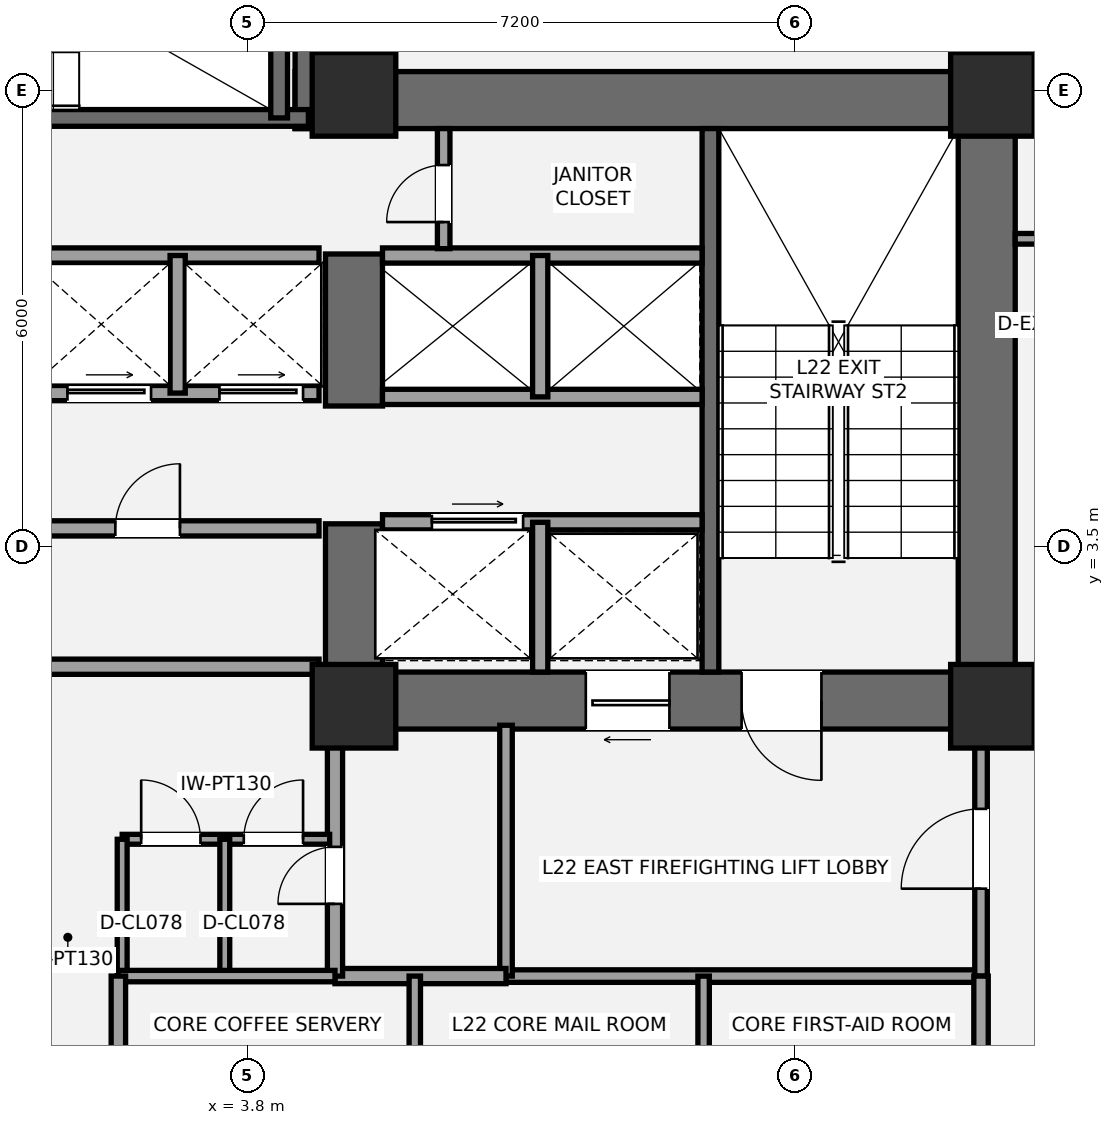
"""IFC4 building model, lengths in metres.
Left out: names, types, materials, properties, quantities, classifications, styles, units other than length and angle.
Written with IfcOpenShell. Run it as: python <this file> out.ifc"""

import sys

from ifc_helpers import new_model, si_unit, direction, frame, frame_2d, origin, origin_2d, place, context, subcontext, project, spatial, rectangle, extrude, element, fill, save


model = new_model("IFC4")
c1 = context("Model", 3, precision=1e-05, world=origin(), true_north=direction((0.0, 1.0)))
c2 = subcontext(c1, "Body", "Model", "MODEL_VIEW")
j1 = project(units=[si_unit("LENGTHUNIT", "METRE"), si_unit("PLANEANGLEUNIT", "RADIAN")], contexts=[c1])
p1 = place(None, origin())
s1 = spatial("IfcSite", under=j1, at=p1, CompositionType="ELEMENT")
p2 = place(p1, origin())
s2 = spatial("IfcBuilding", under=s1, at=p2, CompositionType="ELEMENT")
p3 = place(p2, frame((0.0, 0.0, 86.1)))
s3 = spatial("IfcBuildingStorey", under=s2, at=p3, CompositionType="ELEMENT", Elevation=86.1)
p4 = place(p3, frame((13.525, 1.1, 0.0), z_axis=(0.0, 0.0, 1.0), x_axis=(0.0, 1.0, 0.0)))
e1 = element("IfcWall", 1, at=p4, inside=s3, PredefinedType="SHEAR", context=c2, shape_type="SweptSolid", body=[
    extrude(rectangle(XDim=8.65, YDim=0.75, at=frame_2d((4.325, 0.0))), origin(), (0.0, 0.0, 1.0), 3.5),
])
p5 = place(p3, frame((4.425, 9.375, 0.0), z_axis=(0.0, 0.0, 1.0), x_axis=(1.0, 0.0, 0.0)))
e2 = element("IfcWall", 2, at=p5, inside=s3, PredefinedType="SHEAR", context=c2, shape_type="SweptSolid", body=[
    extrude(rectangle(XDim=9.475, YDim=0.75, at=frame_2d((4.737, 0.0))), origin(), (0.0, 0.0, 1.0), 3.5),
])
p6 = place(p3, frame((13.9, 1.475, 0.0), z_axis=(0.0, 0.0, 1.0), x_axis=(-1.0, 0.0, 0.0)))
e3 = element("IfcWall", 3, at=p6, inside=s3, PredefinedType="SHEAR", context=c2, shape_type="SweptSolid", body=[
    extrude(rectangle(XDim=9.075, YDim=0.75, at=frame_2d((4.538, 0.0))), origin(), (0.0, 0.0, 1.0), 3.5),
])
p7 = place(p6, frame((2.55, 0.0, 0.0)))
e4 = element("IfcOpeningElement", 4, at=p7, cuts=e3, PredefinedType="OPENING", context=c2, shape_type="SweptSolid", body=[
    extrude(rectangle(XDim=1.05, YDim=2.15, at=frame_2d((0.525, 1.075))), frame((0.0, 0.385, 0.0), z_axis=(0.0, -1.0, 0.0), x_axis=(1.0, 0.0, 0.0)), (0.0, 0.0, 1.0), 0.77),
])
p8 = place(p6, frame((4.55, 0.0, 0.0)))
e5 = element("IfcOpeningElement", 5, at=p8, cuts=e3, PredefinedType="OPENING", context=c2, shape_type="SweptSolid", body=[
    extrude(rectangle(XDim=1.1, YDim=2.2, at=frame_2d((0.55, 1.1))), frame((0.0, 0.385, 0.0), z_axis=(0.0, -1.0, 0.0), x_axis=(1.0, 0.0, 0.0)), (0.0, 0.0, 1.0), 0.77),
])
p9 = place(p3, frame((5.2, 1.1, 0.0), z_axis=(0.0, 0.0, 1.0), x_axis=(0.0, 1.0, 0.0)))
e6 = element("IfcWall", 6, at=p9, inside=s3, PredefinedType="SHEAR", context=c2, shape_type="SweptSolid", body=[
    extrude(rectangle(XDim=2.7, YDim=0.75, at=frame_2d((1.35, 0.0))), origin(), (0.0, 0.0, 1.0), 3.5),
])
p10 = place(p3, frame((5.2, 5.35, 0.0), z_axis=(0.0, 0.0, 1.0), x_axis=(0.0, 1.0, 0.0)))
e7 = element("IfcWall", 7, at=p10, inside=s3, PredefinedType="SHEAR", context=c2, shape_type="SweptSolid", body=[
    extrude(rectangle(XDim=2.0, YDim=0.75, at=frame_2d((1.0, 0.0))), origin(), (0.0, 0.0, 1.0), 3.5),
])
p11 = place(p3, frame((9.89, 1.85, 0.0), z_axis=(0.0, 0.0, 1.0), x_axis=(0.0, 1.0, 0.0)))
e8 = element("IfcWall", 8, at=p11, inside=s3, PredefinedType="SHEAR", context=c2, shape_type="SweptSolid", body=[
    extrude(rectangle(XDim=7.15, YDim=0.22, at=frame_2d((3.575, 0.0))), origin(), (0.0, 0.0, 1.0), 3.5),
])
p12 = place(p3, frame((4.8, 9.0, 0.0), z_axis=(0.0, 0.0, 1.0), x_axis=(0.0, 1.0, 0.0)))
e9 = element("IfcWall", 9, at=p12, inside=s3, PredefinedType="SHEAR", context=c2, shape_type="SweptSolid", body=[
    extrude(rectangle(XDim=4.15, YDim=0.75, at=frame_2d((2.075, 0.0))), origin(), (0.0, 0.0, 1.0), 3.5),
])
p13 = place(p3, frame((-4.7, 9.14, 0.0), z_axis=(0.0, 0.0, 1.0), x_axis=(1.0, 0.0, 0.0)))
e10 = element("IfcWall", 10, at=p13, inside=s3, PredefinedType="SHEAR", context=c2, shape_type="SweptSolid", body=[
    extrude(rectangle(XDim=9.3, YDim=0.22, at=frame_2d((4.65, 0.0))), origin(), (0.0, 0.0, 1.0), 3.5),
])
p14 = place(p13, frame((1.15, 0.0, 0.0)))
e11 = element("IfcOpeningElement", 11, at=p14, cuts=e10, PredefinedType="OPENING", context=c2, shape_type="SweptSolid", body=[
    extrude(rectangle(XDim=1.05, YDim=2.15, at=frame_2d((0.525, 1.075))), frame((0.0, 0.12, 0.0), z_axis=(0.0, -1.0, 0.0), x_axis=(1.0, 0.0, 0.0)), (0.0, 0.0, 1.0), 0.24),
])
p15 = place(p3, frame((4.215, 9.14, 0.0), z_axis=(0.0, 0.0, 1.0), x_axis=(0.0, 1.0, 0.0)))
e12 = element("IfcWall", 12, at=p15, inside=s3, PredefinedType="SHEAR", context=c2, shape_type="SweptSolid", body=[
    extrude(rectangle(XDim=3.26, YDim=0.22, at=frame_2d((1.63, 0.0))), origin(), (0.0, 0.0, 1.0), 3.5),
])
for number, where, z_axis, x_axis in (
    (13, (5.2, 1.4, 0.0), (0.0, 0.0, 1.0), (1.0, 0.0, 0.0)),
    (14, (5.2, 9.45, 0.0), (0.0, 0.0, 1.0), (1.0, 0.0, 0.0)),
    (15, (13.6, 1.4, 0.0), (0.0, 0.0, 1.0), (1.0, 0.0, 0.0)),
    (16, (13.6, 9.45, 0.0), (0.0, 0.0, 1.0), (1.0, 0.0, 0.0)),
):
    element("IfcColumn", number, at=place(p3, frame(where, z_axis=z_axis, x_axis=x_axis)), inside=s3, PredefinedType="COLUMN", context=c2, shape_type="SweptSolid", body=[
        extrude(rectangle(XDim=1.1, YDim=1.1, at=origin_2d()), origin(), (0.0, 0.0, 1.0), 3.5),
    ])
p16 = place(p3, frame((7.2, -2.15, 0.0), z_axis=(0.0, 0.0, 1.0), x_axis=(1.0, 0.0, 0.0)))
e17 = element("IfcWall", 17, at=p16, inside=s3, PredefinedType="PARTITIONING", context=c2, shape_type="SweptSolid", body=[
    extrude(rectangle(XDim=6.25, YDim=0.165, at=frame_2d((3.125, 0.0))), origin(), (0.0, 0.0, 1.0), 3.31),
])
p17 = place(p3, frame((7.2, -2.15, 0.0), z_axis=(0.0, 0.0, 1.0), x_axis=(0.0, 1.0, 0.0)))
e18 = element("IfcWall", 18, at=p17, inside=s3, PredefinedType="PARTITIONING", context=c2, shape_type="SweptSolid", body=[
    extrude(rectangle(XDim=3.3, YDim=0.165, at=frame_2d((1.65, 0.0))), origin(), (0.0, 0.0, 1.0), 2.763),
])
p18 = place(p3, frame((13.45, -2.15, 0.0), z_axis=(0.0, 0.0, 1.0), x_axis=(0.0, 1.0, 0.0)))
e19 = element("IfcWall", 19, at=p18, inside=s3, PredefinedType="PARTITIONING", context=c2, shape_type="SweptSolid", body=[
    extrude(rectangle(XDim=3.3, YDim=0.165, at=frame_2d((1.65, 0.0))), origin(), (0.0, 0.0, 1.0), 2.763),
])
p19 = place(p18, frame((1.15, 0.0, 0.0)))
e20 = element("IfcOpeningElement", 20, at=p19, cuts=e19, PredefinedType="OPENING", context=c2, shape_type="SweptSolid", body=[
    extrude(rectangle(XDim=1.05, YDim=2.15, at=frame_2d((0.525, 1.075))), frame((0.0, 0.093, 0.0), z_axis=(0.0, -1.0, 0.0), x_axis=(1.0, 0.0, 0.0)), (0.0, 0.0, 1.0), 0.185),
])
p20 = place(p3, frame((4.95, -2.15, 0.0), z_axis=(0.0, 0.0, 1.0), x_axis=(1.0, 0.0, 0.0)))
e21 = element("IfcWall", 21, at=p20, inside=s3, PredefinedType="SOLIDWALL", context=c2, shape_type="SweptSolid", body=[
    extrude(rectangle(XDim=2.25, YDim=0.2, at=frame_2d((1.125, 0.0))), origin(), (0.0, 0.0, 1.0), 3.31),
])
p21 = place(p3, frame((4.95, -2.15, 0.0), z_axis=(0.0, 0.0, 1.0), x_axis=(0.0, 1.0, 0.0)))
e22 = element("IfcWall", 22, at=p21, inside=s3, PredefinedType="SOLIDWALL", context=c2, shape_type="SweptSolid", body=[
    extrude(rectangle(XDim=3.3, YDim=0.2, at=frame_2d((1.65, 0.0))), origin(), (0.0, 0.0, 1.0), 2.763),
])
p22 = place(p21, frame((0.95, 0.0, 0.0)))
e23 = element("IfcOpeningElement", 23, at=p22, cuts=e22, PredefinedType="OPENING", context=c2, shape_type="SweptSolid", body=[
    extrude(rectangle(XDim=0.75, YDim=2.1, at=frame_2d((0.375, 1.05))), frame((0.0, 0.11, 0.0), z_axis=(0.0, -1.0, 0.0), x_axis=(1.0, 0.0, 0.0)), (0.0, 0.0, 1.0), 0.22),
])
p23 = place(p3, frame((2.15, -0.35, 0.0), z_axis=(0.0, 0.0, 1.0), x_axis=(1.0, 0.0, 0.0)))
e24 = element("IfcWall", 24, at=p23, inside=s3, PredefinedType="PARTITIONING", context=c2, shape_type="SweptSolid", body=[
    extrude(rectangle(XDim=2.73, YDim=0.13, at=frame_2d((1.365, 0.0))), origin(), (0.0, 0.0, 1.0), 3.31),
])
p24 = place(p23, frame((0.25, 0.0, 0.0)))
e25 = element("IfcOpeningElement", 25, at=p24, cuts=e24, PredefinedType="OPENING", context=c2, shape_type="SweptSolid", body=[
    extrude(rectangle(XDim=0.78, YDim=2.1, at=frame_2d((0.39, 1.05))), frame((0.0, 0.075, 0.0), z_axis=(0.0, -1.0, 0.0), x_axis=(1.0, 0.0, 0.0)), (0.0, 0.0, 1.0), 0.15),
])
p25 = place(p23, frame((1.6, 0.0, 0.0)))
e26 = element("IfcOpeningElement", 26, at=p25, cuts=e24, PredefinedType="OPENING", context=c2, shape_type="SweptSolid", body=[
    extrude(rectangle(XDim=0.78, YDim=2.1, at=frame_2d((0.39, 1.05))), frame((0.0, 0.075, 0.0), z_axis=(0.0, -1.0, 0.0), x_axis=(1.0, 0.0, 0.0)), (0.0, 0.0, 1.0), 0.15),
])
for number, where, z_axis, x_axis in (
    (27, (2.15, -2.15, 0.0), (0.0, 0.0, 1.0), (0.0, 1.0, 0.0)),
    (28, (3.5, -2.15, 0.0), (0.0, 0.0, 1.0), (0.0, 1.0, 0.0)),
):
    element("IfcWall", number, at=place(p3, frame(where, z_axis=z_axis, x_axis=x_axis)), inside=s3, PredefinedType="PARTITIONING", context=c2, shape_type="SweptSolid", body=[
        extrude(rectangle(XDim=1.8, YDim=0.13, at=frame_2d((0.9, 0.0))), origin(), (0.0, 0.0, 1.0), 3.31),
    ])
p26 = place(p3, frame((5.575, 3.82, 0.0), z_axis=(0.0, 0.0, 1.0), x_axis=(1.0, 0.0, 0.0)))
e29 = element("IfcWall", 29, at=p26, inside=s3, PredefinedType="SOLIDWALL", context=c2, shape_type="SweptSolid", body=[
    extrude(rectangle(XDim=4.205, YDim=0.2, at=frame_2d((2.103, 0.0))), origin(), (0.0, 0.0, 1.0), 3.31),
])
p27 = place(p26, frame((0.65, 0.0, 0.0)))
e30 = element("IfcOpeningElement", 30, at=p27, cuts=e29, PredefinedType="OPENING", context=c2, shape_type="SweptSolid", body=[
    extrude(rectangle(XDim=1.2, YDim=2.2, at=frame_2d((0.6, 1.1))), frame((0.0, 0.11, 0.0), z_axis=(0.0, -1.0, 0.0), x_axis=(1.0, 0.0, 0.0)), (0.0, 0.0, 1.0), 0.22),
])
p28 = place(p3, frame((7.65, 1.85, 0.0), z_axis=(0.0, 0.0, 1.0), x_axis=(0.0, 1.0, 0.0)))
e31 = element("IfcWall", 31, at=p28, inside=s3, PredefinedType="SOLIDWALL", context=c2, shape_type="SweptSolid", body=[
    extrude(rectangle(XDim=1.97, YDim=0.2, at=frame_2d((0.985, 0.0))), origin(), (0.0, 0.0, 1.0), 3.31),
])
for number, where, z_axis, x_axis in (
    (32, (5.575, 5.47, 0.0), (0.0, 0.0, 1.0), (1.0, 0.0, 0.0)),
    (33, (5.575, 7.33, 0.0), (0.0, 0.0, 1.0), (1.0, 0.0, 0.0)),
):
    element("IfcWall", number, at=place(p3, frame(where, z_axis=z_axis, x_axis=x_axis)), inside=s3, PredefinedType="SOLIDWALL", context=c2, shape_type="SweptSolid", body=[
        extrude(rectangle(XDim=4.205, YDim=0.2, at=frame_2d((2.103, 0.0))), origin(), (0.0, 0.0, 1.0), 3.31),
    ])
p29 = place(p3, frame((7.65, 5.47, 0.0), z_axis=(0.0, 0.0, 1.0), x_axis=(0.0, 1.0, 0.0)))
e34 = element("IfcWall", 34, at=p29, inside=s3, PredefinedType="SOLIDWALL", context=c2, shape_type="SweptSolid", body=[
    extrude(rectangle(XDim=1.86, YDim=0.2, at=frame_2d((0.93, 0.0))), origin(), (0.0, 0.0, 1.0), 3.31),
])
p30 = place(p3, frame((-4.74, 1.92, 0.0), z_axis=(0.0, 0.0, 1.0), x_axis=(1.0, 0.0, 0.0)))
e35 = element("IfcWall", 35, at=p30, inside=s3, PredefinedType="SOLIDWALL", context=c2, shape_type="SweptSolid", body=[
    extrude(rectangle(XDim=9.48, YDim=0.2, at=frame_2d((4.74, 0.0))), origin(), (0.0, 0.0, 1.0), 2.3),
])
p31 = place(p3, frame((-4.74, 3.74, 0.0), z_axis=(0.0, 0.0, 1.0), x_axis=(1.0, 0.0, 0.0)))
e36 = element("IfcWall", 36, at=p31, inside=s3, PredefinedType="SOLIDWALL", context=c2, shape_type="SweptSolid", body=[
    extrude(rectangle(XDim=9.48, YDim=0.2, at=frame_2d((4.74, 0.0))), origin(), (0.0, 0.0, 1.0), 3.31),
])
p32 = place(p31, frame((1.8, 0.0, 0.0)))
e37 = element("IfcOpeningElement", 37, at=p32, cuts=e36, PredefinedType="OPENING", context=c2, shape_type="SweptSolid", body=[
    extrude(rectangle(XDim=0.85, YDim=2.1, at=frame_2d((0.425, 1.05))), frame((0.0, 0.11, 0.0), z_axis=(0.0, -1.0, 0.0), x_axis=(1.0, 0.0, 0.0)), (0.0, 0.0, 1.0), 0.22),
])
p33 = place(p31, frame((6.8, 0.0, 0.0)))
e38 = element("IfcOpeningElement", 38, at=p33, cuts=e36, PredefinedType="OPENING", context=c2, shape_type="SweptSolid", body=[
    extrude(rectangle(XDim=0.85, YDim=2.1, at=frame_2d((0.425, 1.05))), frame((0.0, 0.11, 0.0), z_axis=(0.0, -1.0, 0.0), x_axis=(1.0, 0.0, 0.0)), (0.0, 0.0, 1.0), 0.22),
])
p34 = place(p3, frame((0.88, 5.52, 0.0), z_axis=(0.0, 0.0, 1.0), x_axis=(1.0, 0.0, 0.0)))
e39 = element("IfcWall", 39, at=p34, inside=s3, PredefinedType="SOLIDWALL", context=c2, shape_type="SweptSolid", body=[
    extrude(rectangle(XDim=3.86, YDim=0.2, at=frame_2d((1.93, 0.0))), origin(), (0.0, 0.0, 1.0), 3.31),
])
p35 = place(p34, frame((0.55, 0.0, 0.0)))
e40 = element("IfcOpeningElement", 40, at=p35, cuts=e39, PredefinedType="OPENING", context=c2, shape_type="SweptSolid", body=[
    extrude(rectangle(XDim=1.1, YDim=2.2, at=frame_2d((0.55, 1.1))), frame((0.0, 0.11, 0.0), z_axis=(0.0, -1.0, 0.0), x_axis=(1.0, 0.0, 0.0)), (0.0, 0.0, 1.0), 0.22),
])
p36 = place(p34, frame((2.55, 0.0, 0.0)))
e41 = element("IfcOpeningElement", 41, at=p36, cuts=e39, PredefinedType="OPENING", context=c2, shape_type="SweptSolid", body=[
    extrude(rectangle(XDim=1.1, YDim=2.2, at=frame_2d((0.55, 1.1))), frame((0.0, 0.11, 0.0), z_axis=(0.0, -1.0, 0.0), x_axis=(1.0, 0.0, 0.0)), (0.0, 0.0, 1.0), 0.22),
])
p37 = place(p3, frame((0.88, 7.33, 0.0), z_axis=(0.0, 0.0, 1.0), x_axis=(1.0, 0.0, 0.0)))
e42 = element("IfcWall", 42, at=p37, inside=s3, PredefinedType="SOLIDWALL", context=c2, shape_type="SweptSolid", body=[
    extrude(rectangle(XDim=3.86, YDim=0.2, at=frame_2d((1.93, 0.0))), origin(), (0.0, 0.0, 1.0), 3.31),
])
p38 = place(p3, frame((2.88, 5.52, 0.0), z_axis=(0.0, 0.0, 1.0), x_axis=(0.0, 1.0, 0.0)))
e43 = element("IfcWall", 43, at=p38, inside=s3, PredefinedType="SOLIDWALL", context=c2, shape_type="SweptSolid", body=[
    extrude(rectangle(XDim=1.81, YDim=0.2, at=frame_2d((0.905, 0.0))), origin(), (0.0, 0.0, 1.0), 3.31),
])
p39 = place(p3, frame((6.38, 7.42, 0.0), z_axis=(0.0, 0.0, 1.0), x_axis=(0.0, 1.0, 0.0)))
e44 = element("IfcWall", 44, at=p39, inside=s3, PredefinedType="PARTITIONING", context=c2, shape_type="SweptSolid", body=[
    extrude(rectangle(XDim=1.58, YDim=0.165, at=frame_2d((0.79, 0.0))), origin(), (0.0, 0.0, 1.0), 3.31),
])
p40 = place(p39, frame((0.35, 0.0, 0.0)))
e45 = element("IfcOpeningElement", 45, at=p40, cuts=e44, PredefinedType="OPENING", context=c2, shape_type="SweptSolid", body=[
    extrude(rectangle(XDim=0.75, YDim=2.1, at=frame_2d((0.375, 1.05))), frame((0.0, 0.093, 0.0), z_axis=(0.0, -1.0, 0.0), x_axis=(1.0, 0.0, 0.0)), (0.0, 0.0, 1.0), 0.185),
])
p41 = place(p3, frame((2.1, -2.15, 0.0), z_axis=(0.0, 0.0, 1.0), x_axis=(1.0, 0.0, 0.0)))
e46 = element("IfcWall", 46, at=p41, inside=s3, PredefinedType="PLUMBINGWALL", context=c2, shape_type="SweptSolid", body=[
    extrude(rectangle(XDim=2.85, YDim=0.15, at=frame_2d((1.425, 0.0))), origin(), (0.0, 0.0, 1.0), 3.31),
])
for number, where, z_axis, x_axis in (
    (47, (2.1, -4.05, 0.0), (0.0, 0.0, 1.0), (0.0, 1.0, 0.0)),
    (48, (13.45, -4.05, 0.0), (0.0, 0.0, 1.0), (0.0, 1.0, 0.0)),
):
    element("IfcWall", number, at=place(p3, frame(where, z_axis=z_axis, x_axis=x_axis)), inside=s3, PredefinedType="PLUMBINGWALL", context=c2, shape_type="SweptSolid", body=[
        extrude(rectangle(XDim=1.9, YDim=0.19, at=frame_2d((0.95, 0.0))), origin(), (0.0, 0.0, 1.0), 3.31),
    ])
p42 = place(p3, frame((6.0, -4.05, 0.0), z_axis=(0.0, 0.0, 1.0), x_axis=(0.0, 1.0, 0.0)))
e49 = element("IfcWall", 49, at=p42, inside=s3, PredefinedType="PLUMBINGWALL", context=c2, shape_type="SweptSolid", body=[
    extrude(rectangle(XDim=1.9, YDim=0.15, at=frame_2d((0.95, 0.0))), origin(), (0.0, 0.0, 1.0), 2.751),
])
p43 = place(p3, frame((9.8, -4.05, 0.0), z_axis=(0.0, 0.0, 1.0), x_axis=(0.0, 1.0, 0.0)))
e50 = element("IfcWall", 50, at=p43, inside=s3, PredefinedType="PLUMBINGWALL", context=c2, shape_type="SweptSolid", body=[
    extrude(rectangle(XDim=1.9, YDim=0.15, at=frame_2d((0.95, 0.0))), origin(), (0.0, 0.0, 1.0), 3.31),
])
p44 = place(p3, frame((13.9, 7.55, 0.0), z_axis=(0.0, 0.0, 1.0), x_axis=(1.0, 0.0, 0.0)))
e51 = element("IfcWall", 51, at=p44, inside=s3, PredefinedType="PARTITIONING", context=c2, shape_type="SweptSolid", body=[
    extrude(rectangle(XDim=2.3, YDim=0.14, at=frame_2d((1.15, 0.0))), origin(), (0.0, 0.0, 1.0), 2.763),
])
p45 = place(p44, frame((0.32, 0.0, 0.0)))
e52 = element("IfcOpeningElement", 52, at=p45, cuts=e51, PredefinedType="OPENING", context=c2, shape_type="SweptSolid", body=[
    extrude(rectangle(XDim=0.92, YDim=2.15, at=frame_2d((0.46, 1.075))), frame((0.0, 0.08, 0.0), z_axis=(0.0, -1.0, 0.0), x_axis=(1.0, 0.0, 0.0)), (0.0, 0.0, 1.0), 0.16),
])
p46 = place(p7, origin())
e53 = element("IfcDoor", 53, at=p46, inside=s3, OperationType="SINGLE_SWING_LEFT", PredefinedType="DOOR", context=c2, shape_type="SweptSolid", body=[
    extrude(rectangle(XDim=1.05, YDim=2.15, at=frame_2d((0.525, 1.075))), frame((0.0, 0.025, 0.0), z_axis=(0.0, -1.0, 0.0), x_axis=(1.0, 0.0, 0.0)), (0.0, 0.0, 1.0), 0.05),
])
fill(e4, e53)
p47 = place(p19, origin())
e54 = element("IfcDoor", 54, at=p47, inside=s3, OperationType="SINGLE_SWING_LEFT", PredefinedType="DOOR", context=c2, shape_type="SweptSolid", body=[
    extrude(rectangle(XDim=1.05, YDim=2.15, at=frame_2d((0.525, 1.075))), frame((0.0, 0.025, 0.0), z_axis=(0.0, -1.0, 0.0), x_axis=(1.0, 0.0, 0.0)), (0.0, 0.0, 1.0), 0.05),
])
fill(e20, e54)
p48 = place(p22, origin())
e55 = element("IfcDoor", 55, at=p48, inside=s3, OperationType="SINGLE_SWING_LEFT", PredefinedType="DOOR", context=c2, shape_type="SweptSolid", body=[
    extrude(rectangle(XDim=0.75, YDim=2.1, at=frame_2d((0.375, 1.05))), frame((0.0, 0.025, 0.0), z_axis=(0.0, -1.0, 0.0), x_axis=(1.0, 0.0, 0.0)), (0.0, 0.0, 1.0), 0.05),
])
fill(e23, e55)
p49 = place(p24, origin())
e56 = element("IfcDoor", 56, at=p49, inside=s3, OperationType="SINGLE_SWING_LEFT", PredefinedType="DOOR", context=c2, shape_type="SweptSolid", body=[
    extrude(rectangle(XDim=0.78, YDim=2.1, at=frame_2d((0.39, 1.05))), frame((0.0, 0.025, 0.0), z_axis=(0.0, -1.0, 0.0), x_axis=(1.0, 0.0, 0.0)), (0.0, 0.0, 1.0), 0.05),
])
fill(e25, e56)
p50 = place(p25, origin())
e57 = element("IfcDoor", 57, at=p50, inside=s3, OperationType="SINGLE_SWING_RIGHT", PredefinedType="DOOR", context=c2, shape_type="SweptSolid", body=[
    extrude(rectangle(XDim=0.78, YDim=2.1, at=frame_2d((0.39, 1.05))), frame((0.0, 0.025, 0.0), z_axis=(0.0, -1.0, 0.0), x_axis=(1.0, 0.0, 0.0)), (0.0, 0.0, 1.0), 0.05),
])
fill(e26, e57)
p51 = place(p8, origin())
e58 = element("IfcDoor", 58, at=p51, inside=s3, OperationType="SLIDING_TO_LEFT", PredefinedType="DOOR", context=c2, shape_type="SweptSolid", body=[
    extrude(rectangle(XDim=1.1, YDim=2.2, at=frame_2d((0.55, 1.1))), frame((0.0, 0.025, 0.0), z_axis=(0.0, -1.0, 0.0), x_axis=(1.0, 0.0, 0.0)), (0.0, 0.0, 1.0), 0.05),
])
fill(e5, e58)
p52 = place(p27, origin())
e59 = element("IfcDoor", 59, at=p52, inside=s3, OperationType="SLIDING_TO_RIGHT", PredefinedType="DOOR", context=c2, shape_type="SweptSolid", body=[
    extrude(rectangle(XDim=1.2, YDim=2.2, at=frame_2d((0.6, 1.1))), frame((0.0, 0.025, 0.0), z_axis=(0.0, -1.0, 0.0), x_axis=(1.0, 0.0, 0.0)), (0.0, 0.0, 1.0), 0.05),
])
fill(e30, e59)
p53 = place(p33, origin())
e60 = element("IfcDoor", 60, at=p53, inside=s3, OperationType="SINGLE_SWING_RIGHT", PredefinedType="DOOR", context=c2, shape_type="SweptSolid", body=[
    extrude(rectangle(XDim=0.85, YDim=2.1, at=frame_2d((0.425, 1.05))), frame((0.0, 0.025, 0.0), z_axis=(0.0, -1.0, 0.0), x_axis=(1.0, 0.0, 0.0)), (0.0, 0.0, 1.0), 0.05),
])
fill(e38, e60)
p54 = place(p35, origin())
e61 = element("IfcDoor", 61, at=p54, inside=s3, OperationType="SLIDING_TO_LEFT", PredefinedType="DOOR", context=c2, shape_type="SweptSolid", body=[
    extrude(rectangle(XDim=1.1, YDim=2.2, at=frame_2d((0.55, 1.1))), frame((0.0, 0.025, 0.0), z_axis=(0.0, -1.0, 0.0), x_axis=(1.0, 0.0, 0.0)), (0.0, 0.0, 1.0), 0.05),
])
fill(e40, e61)
p55 = place(p36, origin())
e62 = element("IfcDoor", 62, at=p55, inside=s3, OperationType="SLIDING_TO_LEFT", PredefinedType="DOOR", context=c2, shape_type="SweptSolid", body=[
    extrude(rectangle(XDim=1.1, YDim=2.2, at=frame_2d((0.55, 1.1))), frame((0.0, 0.025, 0.0), z_axis=(0.0, -1.0, 0.0), x_axis=(1.0, 0.0, 0.0)), (0.0, 0.0, 1.0), 0.05),
])
fill(e41, e62)
p56 = place(p40, origin())
e63 = element("IfcDoor", 63, at=p56, inside=s3, OperationType="SINGLE_SWING_LEFT", PredefinedType="DOOR", context=c2, shape_type="SweptSolid", body=[
    extrude(rectangle(XDim=0.75, YDim=2.1, at=frame_2d((0.375, 1.05))), frame((0.0, 0.025, 0.0), z_axis=(0.0, -1.0, 0.0), x_axis=(1.0, 0.0, 0.0)), (0.0, 0.0, 1.0), 0.05),
])
fill(e45, e63)
save(model, sys.argv[1])
